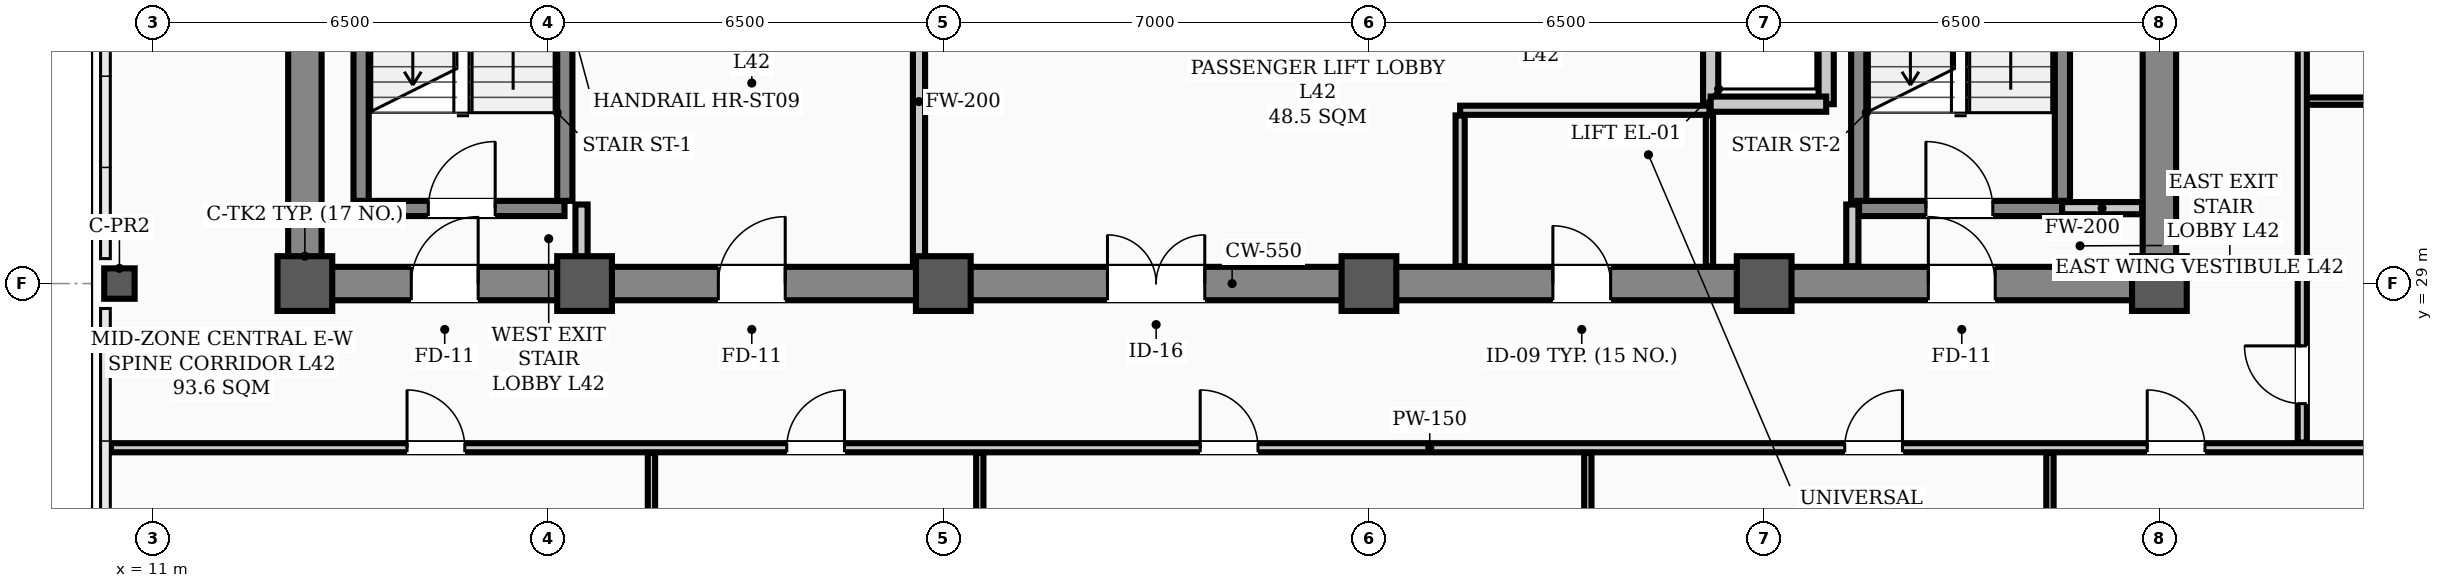
"""IFC4 building model, lengths in metres.
Left out: names, types, materials, properties, quantities, classifications, styles, units other than length and angle.
Written with IfcOpenShell. Run it as: python <this file> out.ifc"""

import sys

from ifc_helpers import new_model, si_unit, direction, frame, frame_2d, origin, origin_2d, place, context, subcontext, project, spatial, rectangle, hollow_rectangle, extrude, element, fill, save


model = new_model("IFC4")
c1 = context("Model", 3, precision=1e-05, world=origin(), true_north=direction((0.0, 1.0)))
c2 = subcontext(c1, "Body", "Model", "MODEL_VIEW")
j1 = project(units=[si_unit("LENGTHUNIT", "METRE"), si_unit("PLANEANGLEUNIT", "RADIAN")], contexts=[c1])
p1 = place(None, origin())
s1 = spatial("IfcSite", under=j1, at=p1, CompositionType="ELEMENT")
p2 = place(p1, origin())
s2 = spatial("IfcBuilding", under=s1, at=p2, CompositionType="ELEMENT")
p3 = place(p2, frame((0.0, 0.0, 169.5)))
s3 = spatial("IfcBuildingStorey", under=s2, at=p3, CompositionType="ELEMENT", Elevation=169.5)
for number, where, z_axis, x_axis in (
    (1, (13.5, 29.0, 0.0), (0.0, 0.0, 1.0), (1.0, 0.0, 0.0)),
    (2, (18.1, 29.0, 0.0), (0.0, 0.0, 1.0), (1.0, 0.0, 0.0)),
    (3, (24.0, 29.0, 0.0), (0.0, 0.0, 1.0), (1.0, 0.0, 0.0)),
    (4, (31.0, 29.0, 0.0), (0.0, 0.0, 1.0), (1.0, 0.0, 0.0)),
    (5, (37.5, 29.0, 0.0), (0.0, 0.0, 1.0), (1.0, 0.0, 0.0)),
    (6, (44.0, 29.0, 0.0), (0.0, 0.0, 1.0), (1.0, 0.0, 0.0)),
):
    element("IfcColumn", number, at=place(p3, frame(where, z_axis=z_axis, x_axis=x_axis)), inside=s3, PredefinedType="COLUMN", context=c2, shape_type="SweptSolid", body=[
        extrude(hollow_rectangle(XDim=0.9, YDim=0.9, WallThickness=0.035, InnerFilletRadius=0.017, OuterFilletRadius=0.052, at=origin_2d()), origin(), (0.0, 0.0, 1.0), 3.9),
    ])
p4 = place(p3, frame((10.45, 29.0, 0.0), z_axis=(0.0, 0.0, 1.0), x_axis=(1.0, 0.0, 0.0)))
e7 = element("IfcColumn", 7, at=p4, inside=s3, PredefinedType="COLUMN", context=c2, shape_type="SweptSolid", body=[
    extrude(hollow_rectangle(XDim=0.5, YDim=0.5, WallThickness=0.024, InnerFilletRadius=0.012, OuterFilletRadius=0.036, at=origin_2d()), origin(), (0.0, 0.0, 1.0), 3.9),
])
p5 = place(p3, frame((13.5, 29.0, 0.0), z_axis=(0.0, 0.0, 1.0), x_axis=(1.0, 0.0, 0.0)))
e8 = element("IfcWall", 8, at=p5, inside=s3, PredefinedType="SHEAR", context=c2, shape_type="SweptSolid", body=[
    extrude(rectangle(XDim=30.5, YDim=0.55, at=frame_2d((15.25, 0.0))), origin(), (0.0, 0.0, 1.0), 3.72),
])
p6 = place(p5, frame((1.75, 0.0, 0.0)))
e9 = element("IfcOpeningElement", 9, at=p6, cuts=e8, PredefinedType="OPENING", context=c2, shape_type="SweptSolid", body=[
    extrude(rectangle(XDim=1.1, YDim=2.08, at=frame_2d((0.55, 1.04))), frame((0.0, 0.285, 0.0), z_axis=(0.0, -1.0, 0.0), x_axis=(1.0, 0.0, 0.0)), (0.0, 0.0, 1.0), 0.57),
])
p7 = place(p5, frame((26.7, 0.0, 0.0)))
e10 = element("IfcOpeningElement", 10, at=p7, cuts=e8, PredefinedType="OPENING", context=c2, shape_type="SweptSolid", body=[
    extrude(rectangle(XDim=1.1, YDim=2.08, at=frame_2d((0.55, 1.04))), frame((0.0, 0.285, 0.0), z_axis=(0.0, -1.0, 0.0), x_axis=(1.0, 0.0, 0.0)), (0.0, 0.0, 1.0), 0.57),
])
p8 = place(p5, frame((6.8, 0.0, 0.0)))
e11 = element("IfcOpeningElement", 11, at=p8, cuts=e8, PredefinedType="OPENING", context=c2, shape_type="SweptSolid", body=[
    extrude(rectangle(XDim=1.1, YDim=2.08, at=frame_2d((0.55, 1.04))), frame((0.0, 0.285, 0.0), z_axis=(0.0, -1.0, 0.0), x_axis=(1.0, 0.0, 0.0)), (0.0, 0.0, 1.0), 0.57),
])
p9 = place(p5, frame((13.2, 0.0, 0.0)))
e12 = element("IfcOpeningElement", 12, at=p9, cuts=e8, PredefinedType="OPENING", context=c2, shape_type="SweptSolid", body=[
    extrude(rectangle(XDim=1.6, YDim=2.08, at=frame_2d((0.8, 1.04))), frame((0.0, 0.285, 0.0), z_axis=(0.0, -1.0, 0.0), x_axis=(1.0, 0.0, 0.0)), (0.0, 0.0, 1.0), 0.57),
])
p10 = place(p5, frame((20.525, 0.0, 0.0)))
e13 = element("IfcOpeningElement", 13, at=p10, cuts=e8, PredefinedType="OPENING", context=c2, shape_type="SweptSolid", body=[
    extrude(rectangle(XDim=0.95, YDim=2.08, at=frame_2d((0.475, 1.04))), frame((0.0, 0.285, 0.0), z_axis=(0.0, -1.0, 0.0), x_axis=(1.0, 0.0, 0.0)), (0.0, 0.0, 1.0), 0.57),
])
for number, where, z_axis, x_axis in (
    (14, (13.5, 29.35, 0.0), (0.0, 0.0, 1.0), (0.0, 1.0, 0.0)),
    (15, (44.0, 29.35, 0.0), (0.0, 0.0, 1.0), (0.0, 1.0, 0.0)),
):
    element("IfcWall", number, at=place(p3, frame(where, z_axis=z_axis, x_axis=x_axis)), inside=s3, PredefinedType="SHEAR", context=c2, shape_type="SweptSolid", body=[
        extrude(rectangle(XDim=8.6, YDim=0.55, at=frame_2d((4.3, 0.0))), origin(), (0.0, 0.0, 1.0), 3.72),
    ])
p11 = place(p3, frame((14.43, 30.235, 0.0), z_axis=(0.0, 0.0, 1.0), x_axis=(1.0, 0.0, 0.0)))
e16 = element("IfcWall", 16, at=p11, inside=s3, PredefinedType="STANDARD", context=c2, shape_type="SweptSolid", body=[
    extrude(rectangle(XDim=3.34, YDim=0.25, at=frame_2d((1.67, 0.0))), origin(), (0.0, 0.0, 1.0), 3.72),
])
p12 = place(p11, frame((1.1, 0.0, 0.0)))
e17 = element("IfcOpeningElement", 17, at=p12, cuts=e16, PredefinedType="OPENING", context=c2, shape_type="SweptSolid", body=[
    extrude(rectangle(XDim=1.1, YDim=2.08, at=frame_2d((0.55, 1.04))), frame((0.0, 0.135, 0.0), z_axis=(0.0, -1.0, 0.0), x_axis=(1.0, 0.0, 0.0)), (0.0, 0.0, 1.0), 0.27),
])
for number, where, z_axis, x_axis in (
    (18, (14.425, 30.36, 0.0), (0.0, 0.0, 1.0), (0.0, 1.0, 0.0)),
    (19, (17.775, 30.36, 0.0), (0.0, 0.0, 1.0), (0.0, 1.0, 0.0)),
):
    element("IfcWall", number, at=place(p3, frame(where, z_axis=z_axis, x_axis=x_axis)), inside=s3, PredefinedType="STANDARD", context=c2, shape_type="SweptSolid", body=[
        extrude(rectangle(XDim=7.184, YDim=0.25, at=frame_2d((3.592, 0.0))), origin(), (0.0, 0.0, 1.0), 3.72),
    ])
p13 = place(p3, frame((39.06, 30.235, 0.0), z_axis=(0.0, 0.0, 1.0), x_axis=(1.0, 0.0, 0.0)))
e20 = element("IfcWall", 20, at=p13, inside=s3, PredefinedType="STANDARD", context=c2, shape_type="SweptSolid", body=[
    extrude(rectangle(XDim=3.34, YDim=0.25, at=frame_2d((1.67, 0.0))), origin(), (0.0, 0.0, 1.0), 3.72),
])
p14 = place(p13, frame((1.1, 0.0, 0.0)))
e21 = element("IfcOpeningElement", 21, at=p14, cuts=e20, PredefinedType="OPENING", context=c2, shape_type="SweptSolid", body=[
    extrude(rectangle(XDim=1.1, YDim=2.08, at=frame_2d((0.55, 1.04))), frame((0.0, 0.135, 0.0), z_axis=(0.0, -1.0, 0.0), x_axis=(1.0, 0.0, 0.0)), (0.0, 0.0, 1.0), 0.27),
])
for number, where, z_axis, x_axis in (
    (22, (39.055, 30.36, 0.0), (0.0, 0.0, 1.0), (0.0, 1.0, 0.0)),
    (23, (42.405, 30.36, 0.0), (0.0, 0.0, 1.0), (0.0, 1.0, 0.0)),
):
    element("IfcWall", number, at=place(p3, frame(where, z_axis=z_axis, x_axis=x_axis)), inside=s3, PredefinedType="STANDARD", context=c2, shape_type="SweptSolid", body=[
        extrude(rectangle(XDim=7.184, YDim=0.25, at=frame_2d((3.592, 0.0))), origin(), (0.0, 0.0, 1.0), 3.72),
    ])
p15 = place(p3, frame((36.62, 31.95, 0.0), z_axis=(0.0, 0.0, 1.0), x_axis=(0.0, 1.0, 0.0)))
e24 = element("IfcWall", 24, at=p15, inside=s3, PredefinedType="STANDARD", context=c2, shape_type="SweptSolid", body=[
    extrude(rectangle(XDim=6.0, YDim=0.25, at=frame_2d((3.0, 0.0))), origin(), (0.0, 0.0, 1.0), 3.35),
])
p16 = place(p15, frame((0.9, 0.0, 0.0)))
e25 = element("IfcOpeningElement", 25, at=p16, cuts=e24, PredefinedType="OPENING", context=c2, shape_type="SweptSolid", body=[
    extrude(rectangle(XDim=1.1, YDim=2.08, at=frame_2d((0.55, 1.04))), frame((0.0, 0.135, 0.0), z_axis=(0.0, -1.0, 0.0), x_axis=(1.0, 0.0, 0.0)), (0.0, 0.0, 1.0), 0.27),
])
p17 = place(p15, frame((4.0, 0.0, 0.0)))
e26 = element("IfcOpeningElement", 26, at=p17, cuts=e24, PredefinedType="OPENING", context=c2, shape_type="SweptSolid", body=[
    extrude(rectangle(XDim=1.1, YDim=2.08, at=frame_2d((0.55, 1.04))), frame((0.0, 0.135, 0.0), z_axis=(0.0, -1.0, 0.0), x_axis=(1.0, 0.0, 0.0)), (0.0, 0.0, 1.0), 0.27),
])
p18 = place(p3, frame((38.52, 31.95, 0.0), z_axis=(0.0, 0.0, 1.0), x_axis=(0.0, 1.0, 0.0)))
e27 = element("IfcWall", 27, at=p18, inside=s3, PredefinedType="STANDARD", context=c2, shape_type="SweptSolid", body=[
    extrude(rectangle(XDim=6.0, YDim=0.25, at=frame_2d((3.0, 0.0))), origin(), (0.0, 0.0, 1.0), 3.35),
])
p19 = place(p3, frame((36.62, 31.95, 0.0), z_axis=(0.0, 0.0, 1.0), x_axis=(1.0, 0.0, 0.0)))
e28 = element("IfcWall", 28, at=p19, inside=s3, PredefinedType="STANDARD", context=c2, shape_type="SweptSolid", body=[
    extrude(rectangle(XDim=1.9, YDim=0.25, at=frame_2d((0.95, 0.0))), origin(), (0.0, 0.0, 1.0), 3.48),
])
p20 = place(p3, frame((42.4, 30.24, 0.0), z_axis=(0.0, 0.0, 1.0), x_axis=(1.0, 0.0, 0.0)))
e29 = element("IfcWall", 29, at=p20, inside=s3, PredefinedType="STANDARD", context=c2, shape_type="SweptSolid", body=[
    extrude(rectangle(XDim=1.315, YDim=0.2, at=frame_2d((0.658, 0.0))), origin(), (0.0, 0.0, 1.0), 3.2),
])
p21 = place(p3, frame((32.5, 31.85, 0.0), z_axis=(0.0, 0.0, 1.0), x_axis=(1.0, 0.0, 0.0)))
e30 = element("IfcWall", 30, at=p21, inside=s3, PredefinedType="PARTITIONING", context=c2, shape_type="SweptSolid", body=[
    extrude(rectangle(XDim=4.1, YDim=0.15, at=frame_2d((2.05, 0.0))), origin(), (0.0, 0.0, 1.0), 3.72),
])
p22 = place(p3, frame((10.31, 26.3, 0.0), z_axis=(0.0, 0.0, 1.0), x_axis=(1.0, 0.0, 0.0)))
e31 = element("IfcWall", 31, at=p22, inside=s3, PredefinedType="PARTITIONING", context=c2, shape_type="SweptSolid", body=[
    extrude(rectangle(XDim=43.38, YDim=0.15, at=frame_2d((21.69, 0.0))), origin(), (0.0, 0.0, 1.0), 3.2),
])
p23 = place(p22, frame((4.87, 0.0, 0.0)))
e32 = element("IfcOpeningElement", 32, at=p23, cuts=e31, PredefinedType="OPENING", context=c2, shape_type="SweptSolid", body=[
    extrude(rectangle(XDim=0.95, YDim=2.08, at=frame_2d((0.475, 1.04))), frame((0.0, 0.085, 0.0), z_axis=(0.0, -1.0, 0.0), x_axis=(1.0, 0.0, 0.0)), (0.0, 0.0, 1.0), 0.17),
])
p24 = place(p22, frame((11.115, 0.0, 0.0)))
e33 = element("IfcOpeningElement", 33, at=p24, cuts=e31, PredefinedType="OPENING", context=c2, shape_type="SweptSolid", body=[
    extrude(rectangle(XDim=0.95, YDim=2.08, at=frame_2d((0.475, 1.04))), frame((0.0, 0.085, 0.0), z_axis=(0.0, -1.0, 0.0), x_axis=(1.0, 0.0, 0.0)), (0.0, 0.0, 1.0), 0.17),
])
p25 = place(p22, frame((17.915, 0.0, 0.0)))
e34 = element("IfcOpeningElement", 34, at=p25, cuts=e31, PredefinedType="OPENING", context=c2, shape_type="SweptSolid", body=[
    extrude(rectangle(XDim=0.95, YDim=2.08, at=frame_2d((0.475, 1.04))), frame((0.0, 0.085, 0.0), z_axis=(0.0, -1.0, 0.0), x_axis=(1.0, 0.0, 0.0)), (0.0, 0.0, 1.0), 0.17),
])
p26 = place(p22, frame((28.515, 0.0, 0.0)))
e35 = element("IfcOpeningElement", 35, at=p26, cuts=e31, PredefinedType="OPENING", context=c2, shape_type="SweptSolid", body=[
    extrude(rectangle(XDim=0.95, YDim=2.08, at=frame_2d((0.475, 1.04))), frame((0.0, 0.085, 0.0), z_axis=(0.0, -1.0, 0.0), x_axis=(1.0, 0.0, 0.0)), (0.0, 0.0, 1.0), 0.17),
])
p27 = place(p22, frame((33.49, 0.0, 0.0)))
e36 = element("IfcOpeningElement", 36, at=p27, cuts=e31, PredefinedType="OPENING", context=c2, shape_type="SweptSolid", body=[
    extrude(rectangle(XDim=0.95, YDim=2.08, at=frame_2d((0.475, 1.04))), frame((0.0, 0.085, 0.0), z_axis=(0.0, -1.0, 0.0), x_axis=(1.0, 0.0, 0.0)), (0.0, 0.0, 1.0), 0.17),
])
p28 = place(p3, frame((46.35, 32.0, 0.0), z_axis=(0.0, 0.0, 1.0), x_axis=(1.0, 0.0, 0.0)))
e37 = element("IfcWall", 37, at=p28, inside=s3, PredefinedType="PARTITIONING", context=c2, shape_type="SweptSolid", body=[
    extrude(rectangle(XDim=7.34, YDim=0.12, at=frame_2d((3.67, 0.0))), origin(), (0.0, 0.0, 1.0), 3.212),
])
for number, where, z_axis, x_axis in (
    (38, (18.05, 29.285, 0.0), (0.0, 0.0, 1.0), (0.0, 1.0, 0.0)),
    (39, (38.95, 29.285, 0.0), (0.0, 0.0, 1.0), (0.0, 1.0, 0.0)),
):
    element("IfcWall", number, at=place(p3, frame(where, z_axis=z_axis, x_axis=x_axis)), inside=s3, PredefinedType="STANDARD", context=c2, shape_type="SweptSolid", body=[
        extrude(rectangle(XDim=1.015, YDim=0.2, at=frame_2d((0.508, 0.0))), origin(), (0.0, 0.0, 1.0), 3.35),
    ])
p29 = place(p3, frame((23.6, 29.285, 0.0), z_axis=(0.0, 0.0, 1.0), x_axis=(0.0, 1.0, 0.0)))
e40 = element("IfcWall", 40, at=p29, inside=s3, PredefinedType="STANDARD", context=c2, shape_type="SweptSolid", body=[
    extrude(rectangle(XDim=5.415, YDim=0.2, at=frame_2d((2.708, 0.0))), origin(), (0.0, 0.0, 1.0), 3.2),
])
p30 = place(p3, frame((32.5, 29.285, 0.0), z_axis=(0.0, 0.0, 1.0), x_axis=(0.0, 1.0, 0.0)))
e41 = element("IfcWall", 41, at=p30, inside=s3, PredefinedType="PARTITIONING", context=c2, shape_type="SweptSolid", body=[
    extrude(rectangle(XDim=2.48, YDim=0.15, at=frame_2d((1.24, 0.0))), origin(), (0.0, 0.0, 1.0), 3.35),
])
p31 = place(p3, frame((36.6, 29.285, 0.0), z_axis=(0.0, 0.0, 1.0), x_axis=(0.0, 1.0, 0.0)))
e42 = element("IfcWall", 42, at=p31, inside=s3, PredefinedType="PARTITIONING", context=c2, shape_type="SweptSolid", body=[
    extrude(rectangle(XDim=2.48, YDim=0.12, at=frame_2d((1.24, 0.0))), origin(), (0.0, 0.0, 1.0), 3.35),
])
p32 = place(p3, frame((46.35, 26.385, 0.0), z_axis=(0.0, 0.0, 1.0), x_axis=(0.0, 1.0, 0.0)))
e43 = element("IfcWall", 43, at=p32, inside=s3, PredefinedType="PARTITIONING", context=c2, shape_type="SweptSolid", body=[
    extrude(rectangle(XDim=13.58, YDim=0.15, at=frame_2d((6.79, 0.0))), origin(), (0.0, 0.0, 1.0), 3.1),
])
p33 = place(p32, frame((0.64, 0.0, 0.0)))
e44 = element("IfcOpeningElement", 44, at=p33, cuts=e43, PredefinedType="OPENING", context=c2, shape_type="SweptSolid", body=[
    extrude(rectangle(XDim=0.95, YDim=2.08, at=frame_2d((0.475, 1.04))), frame((0.0, 0.085, 0.0), z_axis=(0.0, -1.0, 0.0), x_axis=(1.0, 0.0, 0.0)), (0.0, 0.0, 1.0), 0.17),
])
p34 = place(p32, frame((7.14, 0.0, 0.0)))
e45 = element("IfcOpeningElement", 45, at=p34, cuts=e43, PredefinedType="OPENING", context=c2, shape_type="SweptSolid", body=[
    extrude(rectangle(XDim=0.95, YDim=2.08, at=frame_2d((0.475, 1.04))), frame((0.0, 0.085, 0.0), z_axis=(0.0, -1.0, 0.0), x_axis=(1.0, 0.0, 0.0)), (0.0, 0.0, 1.0), 0.17),
])
p35 = place(p32, frame((11.165, 0.0, 0.0)))
e46 = element("IfcOpeningElement", 46, at=p35, cuts=e43, PredefinedType="OPENING", context=c2, shape_type="SweptSolid", body=[
    extrude(rectangle(XDim=0.95, YDim=2.08, at=frame_2d((0.475, 1.04))), frame((0.0, 0.085, 0.0), z_axis=(0.0, -1.0, 0.0), x_axis=(1.0, 0.0, 0.0)), (0.0, 0.0, 1.0), 0.17),
])
p36 = place(p3, frame((19.2, 17.06, 0.0), z_axis=(0.0, 0.0, 1.0), x_axis=(0.0, 1.0, 0.0)))
e47 = element("IfcWall", 47, at=p36, inside=s3, PredefinedType="PARTITIONING", context=c2, shape_type="SweptSolid", body=[
    extrude(rectangle(XDim=9.155, YDim=0.12, at=frame_2d((4.578, 0.0))), origin(), (0.0, 0.0, 1.0), 3.1),
])
p37 = place(p3, frame((24.6, 18.82, 0.0), z_axis=(0.0, 0.0, 1.0), x_axis=(0.0, 1.0, 0.0)))
e48 = element("IfcWall", 48, at=p37, inside=s3, PredefinedType="PARTITIONING", context=c2, shape_type="SweptSolid", body=[
    extrude(rectangle(XDim=7.395, YDim=0.12, at=frame_2d((3.698, 0.0))), origin(), (0.0, 0.0, 1.0), 3.1),
])
for number, where, z_axis, x_axis in (
    (49, (34.6, 17.06, 0.0), (0.0, 0.0, 1.0), (0.0, 1.0, 0.0)),
    (50, (42.2, 17.06, 0.0), (0.0, 0.0, 1.0), (0.0, 1.0, 0.0)),
):
    element("IfcWall", number, at=place(p3, frame(where, z_axis=z_axis, x_axis=x_axis)), inside=s3, PredefinedType="PARTITIONING", context=c2, shape_type="SweptSolid", body=[
        extrude(rectangle(XDim=9.155, YDim=0.12, at=frame_2d((4.578, 0.0))), origin(), (0.0, 0.0, 1.0), 3.1),
    ])
p38 = place(p12, origin())
e51 = element("IfcDoor", 51, at=p38, inside=s3, OperationType="SINGLE_SWING_RIGHT", PredefinedType="DOOR", context=c2, shape_type="SweptSolid", body=[
    extrude(rectangle(XDim=1.1, YDim=2.08, at=frame_2d((0.55, 1.04))), frame((0.0, 0.025, 0.0), z_axis=(0.0, -1.0, 0.0), x_axis=(1.0, 0.0, 0.0)), (0.0, 0.0, 1.0), 0.05),
])
fill(e17, e51)
p39 = place(p14, origin())
e52 = element("IfcDoor", 52, at=p39, inside=s3, OperationType="SINGLE_SWING_LEFT", PredefinedType="DOOR", context=c2, shape_type="SweptSolid", body=[
    extrude(rectangle(XDim=1.1, YDim=2.08, at=frame_2d((0.55, 1.04))), frame((0.0, 0.025, 0.0), z_axis=(0.0, -1.0, 0.0), x_axis=(1.0, 0.0, 0.0)), (0.0, 0.0, 1.0), 0.05),
])
fill(e21, e52)
p40 = place(p6, origin())
e53 = element("IfcDoor", 53, at=p40, inside=s3, OperationType="SINGLE_SWING_RIGHT", PredefinedType="DOOR", context=c2, shape_type="SweptSolid", body=[
    extrude(rectangle(XDim=1.1, YDim=2.08, at=frame_2d((0.55, 1.04))), frame((0.0, 0.025, 0.0), z_axis=(0.0, -1.0, 0.0), x_axis=(1.0, 0.0, 0.0)), (0.0, 0.0, 1.0), 0.05),
])
fill(e9, e53)
p41 = place(p7, origin())
e54 = element("IfcDoor", 54, at=p41, inside=s3, OperationType="SINGLE_SWING_LEFT", PredefinedType="DOOR", context=c2, shape_type="SweptSolid", body=[
    extrude(rectangle(XDim=1.1, YDim=2.08, at=frame_2d((0.55, 1.04))), frame((0.0, 0.025, 0.0), z_axis=(0.0, -1.0, 0.0), x_axis=(1.0, 0.0, 0.0)), (0.0, 0.0, 1.0), 0.05),
])
fill(e10, e54)
p42 = place(p8, origin())
e55 = element("IfcDoor", 55, at=p42, inside=s3, OperationType="SINGLE_SWING_RIGHT", PredefinedType="DOOR", context=c2, shape_type="SweptSolid", body=[
    extrude(rectangle(XDim=1.1, YDim=2.08, at=frame_2d((0.55, 1.04))), frame((0.0, 0.025, 0.0), z_axis=(0.0, -1.0, 0.0), x_axis=(1.0, 0.0, 0.0)), (0.0, 0.0, 1.0), 0.05),
])
fill(e11, e55)
p43 = place(p9, origin())
e56 = element("IfcDoor", 56, at=p43, inside=s3, OperationType="DOUBLE_DOOR_SINGLE_SWING", PredefinedType="DOOR", context=c2, shape_type="SweptSolid", body=[
    extrude(rectangle(XDim=1.6, YDim=2.08, at=frame_2d((0.8, 1.04))), frame((0.0, 0.025, 0.0), z_axis=(0.0, -1.0, 0.0), x_axis=(1.0, 0.0, 0.0)), (0.0, 0.0, 1.0), 0.05),
])
fill(e12, e56)
p44 = place(p10, origin())
e57 = element("IfcDoor", 57, at=p44, inside=s3, OperationType="SINGLE_SWING_LEFT", PredefinedType="DOOR", context=c2, shape_type="SweptSolid", body=[
    extrude(rectangle(XDim=0.95, YDim=2.08, at=frame_2d((0.475, 1.04))), frame((0.0, 0.025, 0.0), z_axis=(0.0, -1.0, 0.0), x_axis=(1.0, 0.0, 0.0)), (0.0, 0.0, 1.0), 0.05),
])
fill(e13, e57)
p45 = place(p23, origin())
e58 = element("IfcDoor", 58, at=p45, inside=s3, OperationType="SINGLE_SWING_LEFT", PredefinedType="DOOR", context=c2, shape_type="SweptSolid", body=[
    extrude(rectangle(XDim=0.95, YDim=2.08, at=frame_2d((0.475, 1.04))), frame((0.0, 0.025, 0.0), z_axis=(0.0, -1.0, 0.0), x_axis=(1.0, 0.0, 0.0)), (0.0, 0.0, 1.0), 0.05),
])
fill(e32, e58)
p46 = place(p24, origin())
e59 = element("IfcDoor", 59, at=p46, inside=s3, OperationType="SINGLE_SWING_RIGHT", PredefinedType="DOOR", context=c2, shape_type="SweptSolid", body=[
    extrude(rectangle(XDim=0.95, YDim=2.08, at=frame_2d((0.475, 1.04))), frame((0.0, 0.025, 0.0), z_axis=(0.0, -1.0, 0.0), x_axis=(1.0, 0.0, 0.0)), (0.0, 0.0, 1.0), 0.05),
])
fill(e33, e59)
p47 = place(p25, origin())
e60 = element("IfcDoor", 60, at=p47, inside=s3, OperationType="SINGLE_SWING_LEFT", PredefinedType="DOOR", context=c2, shape_type="SweptSolid", body=[
    extrude(rectangle(XDim=0.95, YDim=2.08, at=frame_2d((0.475, 1.04))), frame((0.0, 0.025, 0.0), z_axis=(0.0, -1.0, 0.0), x_axis=(1.0, 0.0, 0.0)), (0.0, 0.0, 1.0), 0.05),
])
fill(e34, e60)
p48 = place(p26, origin())
e61 = element("IfcDoor", 61, at=p48, inside=s3, OperationType="SINGLE_SWING_RIGHT", PredefinedType="DOOR", context=c2, shape_type="SweptSolid", body=[
    extrude(rectangle(XDim=0.95, YDim=2.08, at=frame_2d((0.475, 1.04))), frame((0.0, 0.025, 0.0), z_axis=(0.0, -1.0, 0.0), x_axis=(1.0, 0.0, 0.0)), (0.0, 0.0, 1.0), 0.05),
])
fill(e35, e61)
p49 = place(p27, origin())
e62 = element("IfcDoor", 62, at=p49, inside=s3, OperationType="SINGLE_SWING_LEFT", PredefinedType="DOOR", context=c2, shape_type="SweptSolid", body=[
    extrude(rectangle(XDim=0.95, YDim=2.08, at=frame_2d((0.475, 1.04))), frame((0.0, 0.025, 0.0), z_axis=(0.0, -1.0, 0.0), x_axis=(1.0, 0.0, 0.0)), (0.0, 0.0, 1.0), 0.05),
])
fill(e36, e62)
p50 = place(p33, origin())
e63 = element("IfcDoor", 63, at=p50, inside=s3, OperationType="SINGLE_SWING_RIGHT", PredefinedType="DOOR", context=c2, shape_type="SweptSolid", body=[
    extrude(rectangle(XDim=0.95, YDim=2.08, at=frame_2d((0.475, 1.04))), frame((0.0, 0.025, 0.0), z_axis=(0.0, -1.0, 0.0), x_axis=(1.0, 0.0, 0.0)), (0.0, 0.0, 1.0), 0.05),
])
fill(e44, e63)
save(model, sys.argv[1])
